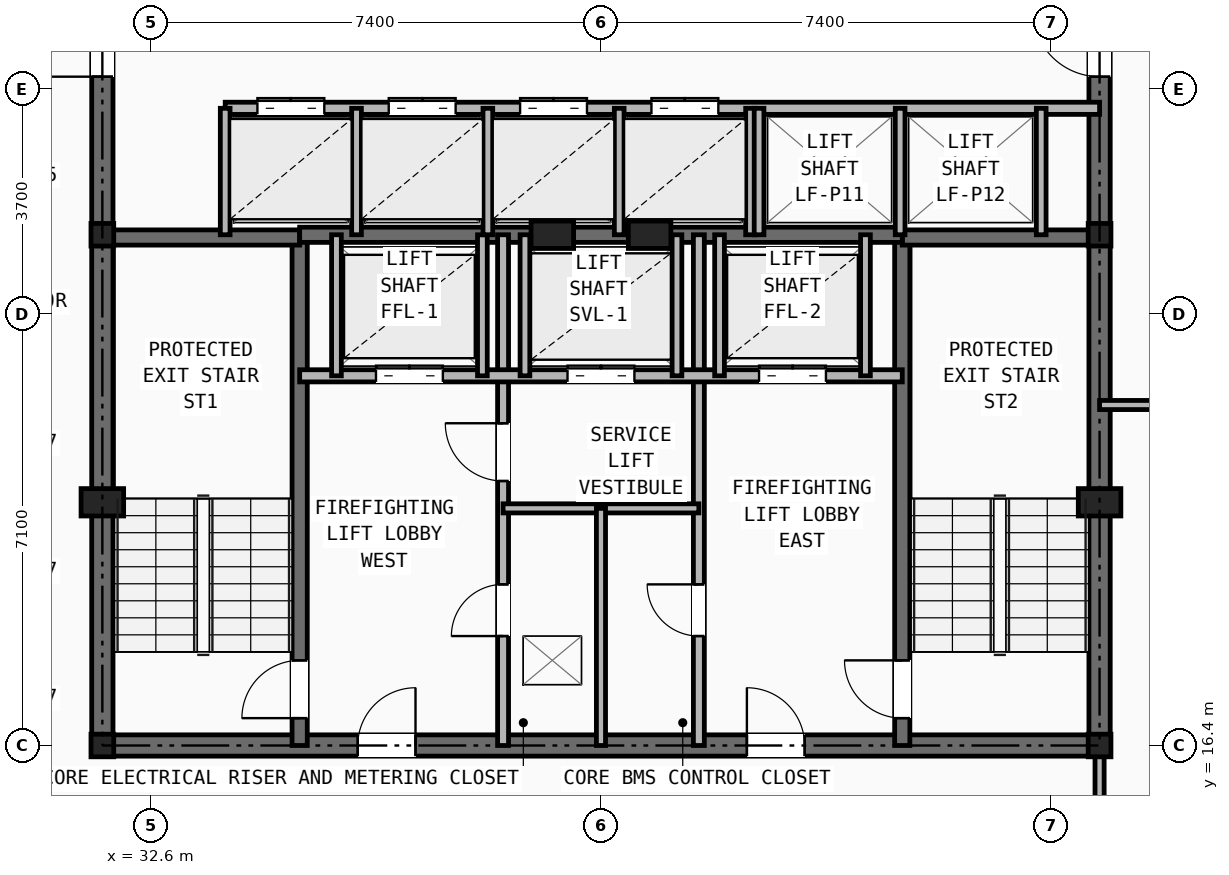
"""IFC4 building model, lengths in metres.
Left out: names, types, materials, properties, quantities, classifications, styles, units other than length and angle.
Written with IfcOpenShell. Run it as: python <this file> out.ifc"""

import sys

from ifc_helpers import new_model, si_unit, direction, frame, frame_2d, origin, origin_2d, place, context, subcontext, project, spatial, rectangle, i_section, extrude, element, fill, save


model = new_model("IFC4")
c1 = context("Model", 3, precision=1e-05, world=origin(), true_north=direction((0.0, 1.0)))
c2 = subcontext(c1, "Body", "Model", "MODEL_VIEW")
j1 = project(units=[si_unit("LENGTHUNIT", "METRE"), si_unit("PLANEANGLEUNIT", "RADIAN")], contexts=[c1])
p1 = place(None, origin())
s1 = spatial("IfcSite", under=j1, at=p1, CompositionType="ELEMENT")
p2 = place(p1, origin())
s2 = spatial("IfcBuilding", under=s1, at=p2, CompositionType="ELEMENT")
p3 = place(p2, frame((0.0, 0.0, 119.45)))
s3 = spatial("IfcBuildingStorey", under=s2, at=p3, CompositionType="ELEMENT", Elevation=119.45)
for number, where, z_axis, x_axis in (
    (1, (31.8, 16.4, 0.0), (0.0, 0.0, 1.0), (1.0, 0.0, 0.0)),
    (2, (48.2, 16.4, 0.0), (0.0, 0.0, 1.0), (1.0, 0.0, 0.0)),
    (3, (31.8, 24.8, 0.0), (0.0, 0.0, 1.0), (1.0, 0.0, 0.0)),
    (4, (48.2, 24.8, 0.0), (0.0, 0.0, 1.0), (1.0, 0.0, 0.0)),
):
    element("IfcColumn", number, at=place(p3, frame(where, z_axis=z_axis, x_axis=x_axis)), inside=s3, PredefinedType="COLUMN", context=c2, shape_type="SweptSolid", body=[
        extrude(i_section(OverallWidth=0.374, OverallDepth=0.372, WebThickness=0.016, FlangeThickness=0.026, at=origin_2d()), origin(), (0.0, 0.0, 1.0), 3.45),
    ])
for number, where, z_axis, x_axis in (
    (5, (31.8, 20.4, 0.0), (0.0, 0.0, 1.0), (1.0, 0.0, 0.0)),
    (6, (48.2, 20.4, 0.0), (0.0, 0.0, 1.0), (1.0, 0.0, 0.0)),
    (7, (39.2, 24.8, 0.0), (0.0, 0.0, 1.0), (1.0, 0.0, 0.0)),
    (8, (40.8, 24.8, 0.0), (0.0, 0.0, 1.0), (1.0, 0.0, 0.0)),
):
    element("IfcColumn", number, at=place(p3, frame(where, z_axis=z_axis, x_axis=x_axis)), inside=s3, PredefinedType="PILASTER", context=c2, shape_type="SweptSolid", body=[
        extrude(rectangle(XDim=0.7, YDim=0.45, at=origin_2d()), origin(), (0.0, 0.0, 1.0), 3.45),
    ])
p4 = place(p3, frame((31.8, 16.4, 0.0), z_axis=(0.0, 0.0, 1.0), x_axis=(1.0, 0.0, 0.0)))
e9 = element("IfcWall", 9, at=p4, inside=s3, PredefinedType="SHEAR", context=c2, shape_type="SweptSolid", body=[
    extrude(rectangle(XDim=16.4, YDim=0.35, at=frame_2d((8.2, 0.0))), origin(), (0.0, 0.0, 1.0), 3.21),
])
p5 = place(p4, frame((4.2, 0.0, 0.0)))
e10 = element("IfcOpeningElement", 10, at=p5, cuts=e9, PredefinedType="OPENING", context=c2, shape_type="SweptSolid", body=[
    extrude(rectangle(XDim=0.95, YDim=2.1, at=frame_2d((0.475, 1.05))), frame((0.0, 0.185, 0.0), z_axis=(0.0, -1.0, 0.0), x_axis=(1.0, 0.0, 0.0)), (0.0, 0.0, 1.0), 0.37),
])
p6 = place(p4, frame((10.6, 0.0, 0.0)))
e11 = element("IfcOpeningElement", 11, at=p6, cuts=e9, PredefinedType="OPENING", context=c2, shape_type="SweptSolid", body=[
    extrude(rectangle(XDim=0.95, YDim=2.1, at=frame_2d((0.475, 1.05))), frame((0.0, 0.185, 0.0), z_axis=(0.0, -1.0, 0.0), x_axis=(1.0, 0.0, 0.0)), (0.0, 0.0, 1.0), 0.37),
])
p7 = place(p3, frame((31.8, 16.4, 0.0), z_axis=(0.0, 0.0, 1.0), x_axis=(0.0, 1.0, 0.0)))
e12 = element("IfcWall", 12, at=p7, inside=s3, PredefinedType="SHEAR", context=c2, shape_type="SweptSolid", body=[
    extrude(rectangle(XDim=14.8, YDim=0.35, at=frame_2d((7.4, 0.0))), origin(), (0.0, 0.0, 1.0), 3.21),
])
p8 = place(p7, frame((11.0, 0.0, 0.0)))
e13 = element("IfcOpeningElement", 13, at=p8, cuts=e12, PredefinedType="OPENING", context=c2, shape_type="SweptSolid", body=[
    extrude(rectangle(XDim=1.1, YDim=2.15, at=frame_2d((0.55, 1.075))), frame((0.0, 0.185, 0.0), z_axis=(0.0, -1.0, 0.0), x_axis=(1.0, 0.0, 0.0)), (0.0, 0.0, 1.0), 0.37),
])
p9 = place(p3, frame((48.2, 16.4, 0.0), z_axis=(0.0, 0.0, 1.0), x_axis=(0.0, 1.0, 0.0)))
e14 = element("IfcWall", 14, at=p9, inside=s3, PredefinedType="SHEAR", context=c2, shape_type="SweptSolid", body=[
    extrude(rectangle(XDim=14.8, YDim=0.35, at=frame_2d((7.4, 0.0))), origin(), (0.0, 0.0, 1.0), 3.21),
])
p10 = place(p9, frame((11.0, 0.0, 0.0)))
e15 = element("IfcOpeningElement", 15, at=p10, cuts=e14, PredefinedType="OPENING", context=c2, shape_type="SweptSolid", body=[
    extrude(rectangle(XDim=1.1, YDim=2.15, at=frame_2d((0.55, 1.075))), frame((0.0, 0.185, 0.0), z_axis=(0.0, -1.0, 0.0), x_axis=(1.0, 0.0, 0.0)), (0.0, 0.0, 1.0), 0.37),
])
p11 = place(p3, frame((35.045, 16.4, 0.0), z_axis=(0.0, 0.0, 1.0), x_axis=(0.0, 1.0, 0.0)))
e16 = element("IfcWall", 16, at=p11, inside=s3, PredefinedType="SHEAR", context=c2, shape_type="SweptSolid", body=[
    extrude(rectangle(XDim=8.4, YDim=0.25, at=frame_2d((4.2, 0.0))), origin(), (0.0, 0.0, 1.0), 3.21),
])
p12 = place(p11, frame((0.45, 0.0, 0.0)))
e17 = element("IfcOpeningElement", 17, at=p12, cuts=e16, PredefinedType="OPENING", context=c2, shape_type="SweptSolid", body=[
    extrude(rectangle(XDim=0.95, YDim=2.1, at=frame_2d((0.475, 1.05))), frame((0.0, 0.135, 0.0), z_axis=(0.0, -1.0, 0.0), x_axis=(1.0, 0.0, 0.0)), (0.0, 0.0, 1.0), 0.27),
])
p13 = place(p3, frame((31.8, 24.755, 0.0), z_axis=(0.0, 0.0, 1.0), x_axis=(1.0, 0.0, 0.0)))
e18 = element("IfcWall", 18, at=p13, inside=s3, PredefinedType="SHEAR", context=c2, shape_type="SweptSolid", body=[
    extrude(rectangle(XDim=3.245, YDim=0.25, at=frame_2d((1.623, 0.0))), origin(), (0.0, 0.0, 1.0), 3.21),
])
p14 = place(p3, frame((44.955, 16.4, 0.0), z_axis=(0.0, 0.0, 1.0), x_axis=(0.0, 1.0, 0.0)))
e19 = element("IfcWall", 19, at=p14, inside=s3, PredefinedType="SHEAR", context=c2, shape_type="SweptSolid", body=[
    extrude(rectangle(XDim=8.4, YDim=0.25, at=frame_2d((4.2, 0.0))), origin(), (0.0, 0.0, 1.0), 3.21),
])
p15 = place(p14, frame((0.45, 0.0, 0.0)))
e20 = element("IfcOpeningElement", 20, at=p15, cuts=e19, PredefinedType="OPENING", context=c2, shape_type="SweptSolid", body=[
    extrude(rectangle(XDim=0.95, YDim=2.1, at=frame_2d((0.475, 1.05))), frame((0.0, 0.135, 0.0), z_axis=(0.0, -1.0, 0.0), x_axis=(1.0, 0.0, 0.0)), (0.0, 0.0, 1.0), 0.27),
])
p16 = place(p3, frame((44.955, 24.755, 0.0), z_axis=(0.0, 0.0, 1.0), x_axis=(1.0, 0.0, 0.0)))
e21 = element("IfcWall", 21, at=p16, inside=s3, PredefinedType="SHEAR", context=c2, shape_type="SweptSolid", body=[
    extrude(rectangle(XDim=3.245, YDim=0.25, at=frame_2d((1.623, 0.0))), origin(), (0.0, 0.0, 1.0), 3.21),
])
p17 = place(p3, frame((35.045, 24.8, 0.0), z_axis=(0.0, 0.0, 1.0), x_axis=(1.0, 0.0, 0.0)))
e22 = element("IfcWall", 22, at=p17, inside=s3, PredefinedType="SHEAR", context=c2, shape_type="SweptSolid", body=[
    extrude(rectangle(XDim=9.91, YDim=0.25, at=frame_2d((4.955, 0.0))), origin(), (0.0, 0.0, 1.0), 3.21),
])
p18 = place(p3, frame((38.39, 16.4, 0.0), z_axis=(0.0, 0.0, 1.0), x_axis=(0.0, 1.0, 0.0)))
e23 = element("IfcWall", 23, at=p18, inside=s3, PredefinedType="PARTITIONING", context=c2, shape_type="SweptSolid", body=[
    extrude(rectangle(XDim=8.4, YDim=0.18, at=frame_2d((4.2, 0.0))), origin(), (0.0, 0.0, 1.0), 2.661),
])
p19 = place(p18, frame((1.8, 0.0, 0.0)))
e24 = element("IfcOpeningElement", 24, at=p19, cuts=e23, PredefinedType="OPENING", context=c2, shape_type="SweptSolid", body=[
    extrude(rectangle(XDim=0.85, YDim=2.05, at=frame_2d((0.425, 1.025))), frame((0.0, 0.1, 0.0), z_axis=(0.0, -1.0, 0.0), x_axis=(1.0, 0.0, 0.0)), (0.0, 0.0, 1.0), 0.2),
])
p20 = place(p18, frame((4.35, 0.0, 0.0)))
e25 = element("IfcOpeningElement", 25, at=p20, cuts=e23, PredefinedType="OPENING", context=c2, shape_type="SweptSolid", body=[
    extrude(rectangle(XDim=0.95, YDim=2.1, at=frame_2d((0.475, 1.05))), frame((0.0, 0.1, 0.0), z_axis=(0.0, -1.0, 0.0), x_axis=(1.0, 0.0, 0.0)), (0.0, 0.0, 1.0), 0.2),
])
p21 = place(p3, frame((41.61, 16.4, 0.0), z_axis=(0.0, 0.0, 1.0), x_axis=(0.0, 1.0, 0.0)))
e26 = element("IfcWall", 26, at=p21, inside=s3, PredefinedType="PARTITIONING", context=c2, shape_type="SweptSolid", body=[
    extrude(rectangle(XDim=8.4, YDim=0.18, at=frame_2d((4.2, 0.0))), origin(), (0.0, 0.0, 1.0), 2.661),
])
p22 = place(p21, frame((1.8, 0.0, 0.0)))
e27 = element("IfcOpeningElement", 27, at=p22, cuts=e26, PredefinedType="OPENING", context=c2, shape_type="SweptSolid", body=[
    extrude(rectangle(XDim=0.85, YDim=2.05, at=frame_2d((0.425, 1.025))), frame((0.0, 0.1, 0.0), z_axis=(0.0, -1.0, 0.0), x_axis=(1.0, 0.0, 0.0)), (0.0, 0.0, 1.0), 0.2),
])
p23 = place(p3, frame((35.045, 22.48, 0.0), z_axis=(0.0, 0.0, 1.0), x_axis=(1.0, 0.0, 0.0)))
e28 = element("IfcWall", 28, at=p23, inside=s3, PredefinedType="SOLIDWALL", context=c2, shape_type="SweptSolid", body=[
    extrude(rectangle(XDim=9.91, YDim=0.2, at=frame_2d((4.955, 0.0))), origin(), (0.0, 0.0, 1.0), 3.21),
])
p24 = place(p23, frame((1.255, 0.0, 0.0)))
e29 = element("IfcOpeningElement", 29, at=p24, cuts=e28, PredefinedType="OPENING", context=c2, shape_type="SweptSolid", body=[
    extrude(rectangle(XDim=1.1, YDim=2.15, at=frame_2d((0.55, 1.075))), frame((0.0, 0.11, 0.0), z_axis=(0.0, -1.0, 0.0), x_axis=(1.0, 0.0, 0.0)), (0.0, 0.0, 1.0), 0.22),
])
p25 = place(p23, frame((7.555, 0.0, 0.0)))
e30 = element("IfcOpeningElement", 30, at=p25, cuts=e28, PredefinedType="OPENING", context=c2, shape_type="SweptSolid", body=[
    extrude(rectangle(XDim=1.1, YDim=2.15, at=frame_2d((0.55, 1.075))), frame((0.0, 0.11, 0.0), z_axis=(0.0, -1.0, 0.0), x_axis=(1.0, 0.0, 0.0)), (0.0, 0.0, 1.0), 0.22),
])
p26 = place(p23, frame((4.405, 0.0, 0.0)))
e31 = element("IfcOpeningElement", 31, at=p26, cuts=e28, PredefinedType="OPENING", context=c2, shape_type="SweptSolid", body=[
    extrude(rectangle(XDim=1.1, YDim=2.15, at=frame_2d((0.55, 1.075))), frame((0.0, 0.11, 0.0), z_axis=(0.0, -1.0, 0.0), x_axis=(1.0, 0.0, 0.0)), (0.0, 0.0, 1.0), 0.22),
])
p27 = place(p3, frame((38.39, 20.3, 0.0), z_axis=(0.0, 0.0, 1.0), x_axis=(1.0, 0.0, 0.0)))
e32 = element("IfcWall", 32, at=p27, inside=s3, PredefinedType="PARTITIONING", context=c2, shape_type="SweptSolid", body=[
    extrude(rectangle(XDim=3.22, YDim=0.15, at=frame_2d((1.61, 0.0))), origin(), (0.0, 0.0, 1.0), 3.21),
])
p28 = place(p3, frame((40.0, 16.4, 0.0), z_axis=(0.0, 0.0, 1.0), x_axis=(0.0, 1.0, 0.0)))
e33 = element("IfcWall", 33, at=p28, inside=s3, PredefinedType="PARTITIONING", context=c2, shape_type="SweptSolid", body=[
    extrude(rectangle(XDim=3.9, YDim=0.15, at=frame_2d((1.95, 0.0))), origin(), (0.0, 0.0, 1.0), 2.661),
])
for number, where, z_axis, x_axis in (
    (34, (35.65, 22.48, 0.0), (0.0, 0.0, 1.0), (0.0, 1.0, 0.0)),
    (35, (38.05, 22.48, 0.0), (0.0, 0.0, 1.0), (0.0, 1.0, 0.0)),
    (36, (41.95, 22.48, 0.0), (0.0, 0.0, 1.0), (0.0, 1.0, 0.0)),
    (37, (44.35, 22.48, 0.0), (0.0, 0.0, 1.0), (0.0, 1.0, 0.0)),
    (38, (38.75, 22.48, 0.0), (0.0, 0.0, 1.0), (0.0, 1.0, 0.0)),
    (39, (41.25, 22.48, 0.0), (0.0, 0.0, 1.0), (0.0, 1.0, 0.0)),
):
    element("IfcWall", number, at=place(p3, frame(where, z_axis=z_axis, x_axis=x_axis)), inside=s3, PredefinedType="SOLIDWALL", context=c2, shape_type="SweptSolid", body=[
        extrude(rectangle(XDim=2.32, YDim=0.16, at=frame_2d((1.16, 0.0))), origin(), (0.0, 0.0, 1.0), 3.21),
    ])
p29 = place(p3, frame((33.82, 26.88, 0.0), z_axis=(0.0, 0.0, 1.0), x_axis=(1.0, 0.0, 0.0)))
e40 = element("IfcWall", 40, at=p29, inside=s3, PredefinedType="SOLIDWALL", context=c2, shape_type="SweptSolid", body=[
    extrude(rectangle(XDim=14.38, YDim=0.2, at=frame_2d((7.19, 0.0))), origin(), (0.0, 0.0, 1.0), 2.661),
])
p30 = place(p29, frame((0.53, 0.0, 0.0)))
e41 = element("IfcOpeningElement", 41, at=p30, cuts=e40, PredefinedType="OPENING", context=c2, shape_type="SweptSolid", body=[
    extrude(rectangle(XDim=1.1, YDim=2.15, at=frame_2d((0.55, 1.075))), frame((0.0, 0.11, 0.0), z_axis=(0.0, -1.0, 0.0), x_axis=(1.0, 0.0, 0.0)), (0.0, 0.0, 1.0), 0.22),
])
p31 = place(p29, frame((2.69, 0.0, 0.0)))
e42 = element("IfcOpeningElement", 42, at=p31, cuts=e40, PredefinedType="OPENING", context=c2, shape_type="SweptSolid", body=[
    extrude(rectangle(XDim=1.1, YDim=2.15, at=frame_2d((0.55, 1.075))), frame((0.0, 0.11, 0.0), z_axis=(0.0, -1.0, 0.0), x_axis=(1.0, 0.0, 0.0)), (0.0, 0.0, 1.0), 0.22),
])
p32 = place(p29, frame((4.85, 0.0, 0.0)))
e43 = element("IfcOpeningElement", 43, at=p32, cuts=e40, PredefinedType="OPENING", context=c2, shape_type="SweptSolid", body=[
    extrude(rectangle(XDim=1.1, YDim=2.15, at=frame_2d((0.55, 1.075))), frame((0.0, 0.11, 0.0), z_axis=(0.0, -1.0, 0.0), x_axis=(1.0, 0.0, 0.0)), (0.0, 0.0, 1.0), 0.22),
])
p33 = place(p29, frame((7.01, 0.0, 0.0)))
e44 = element("IfcOpeningElement", 44, at=p33, cuts=e40, PredefinedType="OPENING", context=c2, shape_type="SweptSolid", body=[
    extrude(rectangle(XDim=1.1, YDim=2.15, at=frame_2d((0.55, 1.075))), frame((0.0, 0.11, 0.0), z_axis=(0.0, -1.0, 0.0), x_axis=(1.0, 0.0, 0.0)), (0.0, 0.0, 1.0), 0.22),
])
for number, where, z_axis, x_axis in (
    (45, (33.82, 24.8, 0.0), (0.0, 0.0, 1.0), (0.0, 1.0, 0.0)),
    (46, (35.98, 24.8, 0.0), (0.0, 0.0, 1.0), (0.0, 1.0, 0.0)),
    (47, (38.14, 24.8, 0.0), (0.0, 0.0, 1.0), (0.0, 1.0, 0.0)),
    (48, (40.3, 24.8, 0.0), (0.0, 0.0, 1.0), (0.0, 1.0, 0.0)),
    (49, (42.46, 24.8, 0.0), (0.0, 0.0, 1.0), (0.0, 1.0, 0.0)),
    (50, (42.6, 24.8, 0.0), (0.0, 0.0, 1.0), (0.0, 1.0, 0.0)),
    (51, (44.92, 24.8, 0.0), (0.0, 0.0, 1.0), (0.0, 1.0, 0.0)),
    (52, (47.24, 24.8, 0.0), (0.0, 0.0, 1.0), (0.0, 1.0, 0.0)),
):
    element("IfcWall", number, at=place(p3, frame(where, z_axis=z_axis, x_axis=x_axis)), inside=s3, PredefinedType="SOLIDWALL", context=c2, shape_type="SweptSolid", body=[
        extrude(rectangle(XDim=2.08, YDim=0.16, at=frame_2d((1.04, 0.0))), origin(), (0.0, 0.0, 1.0), 3.21),
    ])
p34 = place(p3, frame((48.2, 14.1, 0.0), z_axis=(0.0, 0.0, 1.0), x_axis=(0.0, 1.0, 0.0)))
e53 = element("IfcWall", 53, at=p34, inside=s3, PredefinedType="PARTITIONING", context=c2, shape_type="SweptSolid", body=[
    extrude(rectangle(XDim=2.3, YDim=0.15, at=frame_2d((1.15, 0.0))), origin(), (0.0, 0.0, 1.0), 2.661),
])
p35 = place(p3, frame((48.2, 22.0, 0.0), z_axis=(0.0, 0.0, 1.0), x_axis=(1.0, 0.0, 0.0)))
e54 = element("IfcWall", 54, at=p35, inside=s3, PredefinedType="PARTITIONING", context=c2, shape_type="SweptSolid", body=[
    extrude(rectangle(XDim=14.262, YDim=0.15, at=frame_2d((7.131, 0.0))), origin(), (0.0, 0.0, 1.0), 2.589),
])
p36 = place(p35, frame((1.4, 0.0, 0.0)))
e55 = element("IfcOpeningElement", 55, at=p36, cuts=e54, PredefinedType="OPENING", context=c2, shape_type="SweptSolid", body=[
    extrude(rectangle(XDim=0.95, YDim=2.1, at=frame_2d((0.475, 1.05))), frame((0.0, 0.085, 0.0), z_axis=(0.0, -1.0, 0.0), x_axis=(1.0, 0.0, 0.0)), (0.0, 0.0, 1.0), 0.17),
])
p37 = place(p19, origin())
e56 = element("IfcDoor", 56, at=p37, inside=s3, OperationType="SINGLE_SWING_LEFT", PredefinedType="DOOR", context=c2, shape_type="SweptSolid", body=[
    extrude(rectangle(XDim=0.85, YDim=2.05, at=frame_2d((0.425, 1.025))), frame((0.0, 0.025, 0.0), z_axis=(0.0, -1.0, 0.0), x_axis=(1.0, 0.0, 0.0)), (0.0, 0.0, 1.0), 0.05),
])
fill(e24, e56)
p38 = place(p22, origin())
e57 = element("IfcDoor", 57, at=p38, inside=s3, OperationType="SINGLE_SWING_RIGHT", PredefinedType="DOOR", context=c2, shape_type="SweptSolid", body=[
    extrude(rectangle(XDim=0.85, YDim=2.05, at=frame_2d((0.425, 1.025))), frame((0.0, 0.025, 0.0), z_axis=(0.0, -1.0, 0.0), x_axis=(1.0, 0.0, 0.0)), (0.0, 0.0, 1.0), 0.05),
])
fill(e27, e57)
p39 = place(p20, origin())
e58 = element("IfcDoor", 58, at=p39, inside=s3, OperationType="SINGLE_SWING_RIGHT", PredefinedType="DOOR", context=c2, shape_type="SweptSolid", body=[
    extrude(rectangle(XDim=0.95, YDim=2.1, at=frame_2d((0.475, 1.05))), frame((0.0, 0.025, 0.0), z_axis=(0.0, -1.0, 0.0), x_axis=(1.0, 0.0, 0.0)), (0.0, 0.0, 1.0), 0.05),
])
fill(e25, e58)
p40 = place(p12, origin())
e59 = element("IfcDoor", 59, at=p40, inside=s3, OperationType="SINGLE_SWING_LEFT", PredefinedType="DOOR", context=c2, shape_type="SweptSolid", body=[
    extrude(rectangle(XDim=0.95, YDim=2.1, at=frame_2d((0.475, 1.05))), frame((0.0, 0.025, 0.0), z_axis=(0.0, -1.0, 0.0), x_axis=(1.0, 0.0, 0.0)), (0.0, 0.0, 1.0), 0.05),
])
fill(e17, e59)
p41 = place(p15, origin())
e60 = element("IfcDoor", 60, at=p41, inside=s3, OperationType="SINGLE_SWING_RIGHT", PredefinedType="DOOR", context=c2, shape_type="SweptSolid", body=[
    extrude(rectangle(XDim=0.95, YDim=2.1, at=frame_2d((0.475, 1.05))), frame((0.0, 0.025, 0.0), z_axis=(0.0, -1.0, 0.0), x_axis=(1.0, 0.0, 0.0)), (0.0, 0.0, 1.0), 0.05),
])
fill(e20, e60)
p42 = place(p5, origin())
e61 = element("IfcDoor", 61, at=p42, inside=s3, OperationType="SINGLE_SWING_RIGHT", PredefinedType="DOOR", context=c2, shape_type="SweptSolid", body=[
    extrude(rectangle(XDim=0.95, YDim=2.1, at=frame_2d((0.475, 1.05))), frame((0.0, 0.025, 0.0), z_axis=(0.0, -1.0, 0.0), x_axis=(1.0, 0.0, 0.0)), (0.0, 0.0, 1.0), 0.05),
])
fill(e10, e61)
p43 = place(p6, origin())
e62 = element("IfcDoor", 62, at=p43, inside=s3, OperationType="SINGLE_SWING_LEFT", PredefinedType="DOOR", context=c2, shape_type="SweptSolid", body=[
    extrude(rectangle(XDim=0.95, YDim=2.1, at=frame_2d((0.475, 1.05))), frame((0.0, 0.025, 0.0), z_axis=(0.0, -1.0, 0.0), x_axis=(1.0, 0.0, 0.0)), (0.0, 0.0, 1.0), 0.05),
])
fill(e11, e62)
p44 = place(p24, origin())
e63 = element("IfcDoor", 63, at=p44, inside=s3, OperationType="DOUBLE_DOOR_SLIDING", PredefinedType="DOOR", context=c2, shape_type="SweptSolid", body=[
    extrude(rectangle(XDim=1.1, YDim=2.15, at=frame_2d((0.55, 1.075))), frame((0.0, 0.025, 0.0), z_axis=(0.0, -1.0, 0.0), x_axis=(1.0, 0.0, 0.0)), (0.0, 0.0, 1.0), 0.05),
])
fill(e29, e63)
p45 = place(p25, origin())
e64 = element("IfcDoor", 64, at=p45, inside=s3, OperationType="DOUBLE_DOOR_SLIDING", PredefinedType="DOOR", context=c2, shape_type="SweptSolid", body=[
    extrude(rectangle(XDim=1.1, YDim=2.15, at=frame_2d((0.55, 1.075))), frame((0.0, 0.025, 0.0), z_axis=(0.0, -1.0, 0.0), x_axis=(1.0, 0.0, 0.0)), (0.0, 0.0, 1.0), 0.05),
])
fill(e30, e64)
p46 = place(p26, origin())
e65 = element("IfcDoor", 65, at=p46, inside=s3, OperationType="DOUBLE_DOOR_SLIDING", PredefinedType="DOOR", context=c2, shape_type="SweptSolid", body=[
    extrude(rectangle(XDim=1.1, YDim=2.15, at=frame_2d((0.55, 1.075))), frame((0.0, 0.025, 0.0), z_axis=(0.0, -1.0, 0.0), x_axis=(1.0, 0.0, 0.0)), (0.0, 0.0, 1.0), 0.05),
])
fill(e31, e65)
p47 = place(p8, origin())
e66 = element("IfcDoor", 66, at=p47, inside=s3, OperationType="SINGLE_SWING_LEFT", PredefinedType="DOOR", context=c2, shape_type="SweptSolid", body=[
    extrude(rectangle(XDim=1.1, YDim=2.15, at=frame_2d((0.55, 1.075))), frame((0.0, 0.025, 0.0), z_axis=(0.0, -1.0, 0.0), x_axis=(1.0, 0.0, 0.0)), (0.0, 0.0, 1.0), 0.05),
])
fill(e13, e66)
p48 = place(p10, origin())
e67 = element("IfcDoor", 67, at=p48, inside=s3, OperationType="SINGLE_SWING_RIGHT", PredefinedType="DOOR", context=c2, shape_type="SweptSolid", body=[
    extrude(rectangle(XDim=1.1, YDim=2.15, at=frame_2d((0.55, 1.075))), frame((0.0, 0.025, 0.0), z_axis=(0.0, -1.0, 0.0), x_axis=(1.0, 0.0, 0.0)), (0.0, 0.0, 1.0), 0.05),
])
fill(e15, e67)
p49 = place(p30, origin())
e68 = element("IfcDoor", 68, at=p49, inside=s3, OperationType="DOUBLE_DOOR_SLIDING", PredefinedType="DOOR", context=c2, shape_type="SweptSolid", body=[
    extrude(rectangle(XDim=1.1, YDim=2.15, at=frame_2d((0.55, 1.075))), frame((0.0, 0.025, 0.0), z_axis=(0.0, -1.0, 0.0), x_axis=(1.0, 0.0, 0.0)), (0.0, 0.0, 1.0), 0.05),
])
fill(e41, e68)
p50 = place(p31, origin())
e69 = element("IfcDoor", 69, at=p50, inside=s3, OperationType="DOUBLE_DOOR_SLIDING", PredefinedType="DOOR", context=c2, shape_type="SweptSolid", body=[
    extrude(rectangle(XDim=1.1, YDim=2.15, at=frame_2d((0.55, 1.075))), frame((0.0, 0.025, 0.0), z_axis=(0.0, -1.0, 0.0), x_axis=(1.0, 0.0, 0.0)), (0.0, 0.0, 1.0), 0.05),
])
fill(e42, e69)
p51 = place(p32, origin())
e70 = element("IfcDoor", 70, at=p51, inside=s3, OperationType="DOUBLE_DOOR_SLIDING", PredefinedType="DOOR", context=c2, shape_type="SweptSolid", body=[
    extrude(rectangle(XDim=1.1, YDim=2.15, at=frame_2d((0.55, 1.075))), frame((0.0, 0.025, 0.0), z_axis=(0.0, -1.0, 0.0), x_axis=(1.0, 0.0, 0.0)), (0.0, 0.0, 1.0), 0.05),
])
fill(e43, e70)
p52 = place(p33, origin())
e71 = element("IfcDoor", 71, at=p52, inside=s3, OperationType="DOUBLE_DOOR_SLIDING", PredefinedType="DOOR", context=c2, shape_type="SweptSolid", body=[
    extrude(rectangle(XDim=1.1, YDim=2.15, at=frame_2d((0.55, 1.075))), frame((0.0, 0.025, 0.0), z_axis=(0.0, -1.0, 0.0), x_axis=(1.0, 0.0, 0.0)), (0.0, 0.0, 1.0), 0.05),
])
fill(e44, e71)
save(model, sys.argv[1])
